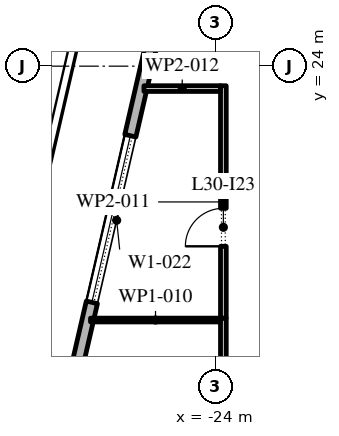
"""IFC4 building model, lengths in metres.
Left out: names, types, materials, properties, quantities, classifications, styles, units other than length and angle.
Written with IfcOpenShell. Run it as: python <this file> out.ifc"""

import sys

from ifc_helpers import new_model, si_unit, direction, frame, frame_2d, origin, place, context, subcontext, project, spatial, rectangle, extrude, element, fill, save


model = new_model("IFC4")
c1 = context("Model", 3, precision=1e-05, world=origin(), true_north=direction((0.0, 1.0)))
c2 = subcontext(c1, "Body", "Model", "MODEL_VIEW")
j1 = project(units=[si_unit("LENGTHUNIT", "METRE"), si_unit("PLANEANGLEUNIT", "RADIAN")], contexts=[c1])
p1 = place(None, origin())
s1 = spatial("IfcSite", under=j1, at=p1, CompositionType="ELEMENT")
p2 = place(p1, origin())
s2 = spatial("IfcBuilding", under=s1, at=p2, CompositionType="ELEMENT")
p3 = place(p2, frame((0.0, 0.0, 139.2)))
s3 = spatial("IfcBuildingStorey", under=s2, at=p3, CompositionType="ELEMENT", Elevation=139.2)
p4 = place(p3, frame((-22.82, 37.016, 0.0), z_axis=(0.0, 0.0, 1.0), x_axis=(-0.224953880882, -0.974369412223, 0.0)))
e1 = element("IfcWall", 1, at=p4, inside=s3, PredefinedType="STANDARD", context=c2, shape_type="SweptSolid", body=[
    extrude(rectangle(XDim=49.5, YDim=0.3, at=frame_2d((24.75, 0.0))), origin(), (0.0, 0.0, 1.0), 4.0),
])
p5 = place(p4, frame((1.157, 0.0, 0.45)))
e2 = element("IfcOpeningElement", 2, at=p5, cuts=e1, PredefinedType="OPENING", context=c2, shape_type="SweptSolid", body=[
    extrude(rectangle(XDim=4.5, YDim=3.05, at=frame_2d((2.25, 1.525))), frame((0.0, 0.16, 0.0), z_axis=(0.0, -1.0, 0.0), x_axis=(1.0, 0.0, 0.0)), (0.0, 0.0, 1.0), 0.32),
])
p6 = place(p4, frame((8.121, 0.0, 0.45)))
e3 = element("IfcOpeningElement", 3, at=p6, cuts=e1, PredefinedType="OPENING", context=c2, shape_type="SweptSolid", body=[
    extrude(rectangle(XDim=4.5, YDim=3.05, at=frame_2d((2.25, 1.525))), frame((0.0, 0.16, 0.0), z_axis=(0.0, -1.0, 0.0), x_axis=(1.0, 0.0, 0.0)), (0.0, 0.0, 1.0), 0.32),
])
p7 = place(p4, frame((15.236, 0.0, 0.45)))
e4 = element("IfcOpeningElement", 4, at=p7, cuts=e1, PredefinedType="OPENING", context=c2, shape_type="SweptSolid", body=[
    extrude(rectangle(XDim=4.5, YDim=3.05, at=frame_2d((2.25, 1.525))), frame((0.0, 0.16, 0.0), z_axis=(0.0, -1.0, 0.0), x_axis=(1.0, 0.0, 0.0)), (0.0, 0.0, 1.0), 0.32),
])
p8 = place(p4, frame((23.4, 0.0, 0.0)))
e5 = element("IfcOpeningElement", 5, at=p8, cuts=e1, PredefinedType="OPENING", context=c2, shape_type="SweptSolid", body=[
    extrude(rectangle(XDim=2.4, YDim=3.5, at=frame_2d((1.2, 1.75))), frame((0.0, 0.16, 0.0), z_axis=(0.0, -1.0, 0.0), x_axis=(1.0, 0.0, 0.0)), (0.0, 0.0, 1.0), 0.32),
])
p9 = place(p4, frame((29.464, 0.0, 0.45)))
e6 = element("IfcOpeningElement", 6, at=p9, cuts=e1, PredefinedType="OPENING", context=c2, shape_type="SweptSolid", body=[
    extrude(rectangle(XDim=4.5, YDim=2.875, at=frame_2d((2.25, 1.438))), frame((0.0, 0.16, 0.0), z_axis=(0.0, -1.0, 0.0), x_axis=(1.0, 0.0, 0.0)), (0.0, 0.0, 1.0), 0.32),
])
p10 = place(p4, frame((36.579, 0.0, 0.45)))
e7 = element("IfcOpeningElement", 7, at=p10, cuts=e1, PredefinedType="OPENING", context=c2, shape_type="SweptSolid", body=[
    extrude(rectangle(XDim=4.5, YDim=2.675, at=frame_2d((2.25, 1.337))), frame((0.0, 0.16, 0.0), z_axis=(0.0, -1.0, 0.0), x_axis=(1.0, 0.0, 0.0)), (0.0, 0.0, 1.0), 0.32),
])
p11 = place(p4, frame((43.693, 0.0, 0.45)))
e8 = element("IfcOpeningElement", 8, at=p11, cuts=e1, PredefinedType="OPENING", context=c2, shape_type="SweptSolid", body=[
    extrude(rectangle(XDim=4.5, YDim=3.05, at=frame_2d((2.25, 1.525))), frame((0.0, 0.16, 0.0), z_axis=(0.0, -1.0, 0.0), x_axis=(1.0, 0.0, 0.0)), (0.0, 0.0, 1.0), 0.32),
])
p12 = place(p3, frame((-23.8, 9.55, 0.0), z_axis=(0.0, 0.0, 1.0), x_axis=(0.0, 1.0, 0.0)))
e9 = element("IfcWall", 9, at=p12, inside=s3, PredefinedType="PARTITIONING", context=c2, shape_type="SweptSolid", body=[
    extrude(rectangle(XDim=7.82, YDim=0.15, at=frame_2d((3.91, 0.0))), origin(), (0.0, 0.0, 1.0), 4.0),
])
p13 = place(p12, frame((1.87, 0.0, 0.0)))
e10 = element("IfcOpeningElement", 10, at=p13, cuts=e9, PredefinedType="OPENING", context=c2, shape_type="SweptSolid", body=[
    extrude(rectangle(XDim=1.0, YDim=2.1, at=frame_2d((0.5, 1.05))), frame((0.0, 0.085, 0.0), z_axis=(0.0, -1.0, 0.0), x_axis=(1.0, 0.0, 0.0)), (0.0, 0.0, 1.0), 0.17),
])
p14 = place(p3, frame((-23.875, 17.32, 0.0), z_axis=(0.0, 0.0, 1.0), x_axis=(-1.0, 0.0, 0.0)))
e11 = element("IfcWall", 11, at=p14, inside=s3, PredefinedType="PARTITIONING", context=c2, shape_type="SweptSolid", body=[
    extrude(rectangle(XDim=3.421, YDim=0.1, at=frame_2d((1.71, 0.0))), origin(), (0.0, 0.0, 1.0), 4.0),
])
p15 = place(p3, frame((-23.8, 17.37, 0.0), z_axis=(0.0, 0.0, 1.0), x_axis=(0.0, 1.0, 0.0)))
e12 = element("IfcWall", 12, at=p15, inside=s3, PredefinedType="PARTITIONING", context=c2, shape_type="SweptSolid", body=[
    extrude(rectangle(XDim=6.115, YDim=0.15, at=frame_2d((3.058, 0.0))), origin(), (0.0, 0.0, 1.0), 4.0),
])
p16 = place(p15, frame((1.89, 0.0, 0.0)))
e13 = element("IfcOpeningElement", 13, at=p16, cuts=e12, PredefinedType="OPENING", context=c2, shape_type="SweptSolid", body=[
    extrude(rectangle(XDim=1.0, YDim=2.1, at=frame_2d((0.5, 1.05))), frame((0.0, 0.085, 0.0), z_axis=(0.0, -1.0, 0.0), x_axis=(1.0, 0.0, 0.0)), (0.0, 0.0, 1.0), 0.17),
])
p17 = place(p3, frame((-23.875, 23.41, 0.0), z_axis=(0.0, 0.0, 1.0), x_axis=(-1.0, 0.0, 0.0)))
e14 = element("IfcWall", 14, at=p17, inside=s3, PredefinedType="PARTITIONING", context=c2, shape_type="SweptSolid", body=[
    extrude(rectangle(XDim=2.015, YDim=0.15, at=frame_2d((1.007, 0.0))), origin(), (0.0, 0.0, 1.0), 4.0),
])
p18 = place(p7, origin())
e15 = element("IfcWindow", 15, at=p18, inside=s3, PartitioningType="DOUBLE_PANEL_VERTICAL", PredefinedType="WINDOW", context=c2, shape_type="SweptSolid", body=[
    extrude(rectangle(XDim=4.5, YDim=3.05, at=frame_2d((2.25, 1.525))), frame((0.0, 0.03, 0.0), z_axis=(0.0, -1.0, 0.0), x_axis=(1.0, 0.0, 0.0)), (0.0, 0.0, 1.0), 0.06),
])
fill(e4, e15)
p19 = place(p16, origin())
e16 = element("IfcDoor", 16, at=p19, inside=s3, OperationType="SINGLE_SWING_RIGHT", PredefinedType="DOOR", context=c2, shape_type="SweptSolid", body=[
    extrude(rectangle(XDim=1.0, YDim=2.1, at=frame_2d((0.5, 1.05))), frame((0.0, 0.025, 0.0), z_axis=(0.0, -1.0, 0.0), x_axis=(1.0, 0.0, 0.0)), (0.0, 0.0, 1.0), 0.05),
])
fill(e13, e16)
save(model, sys.argv[1])
